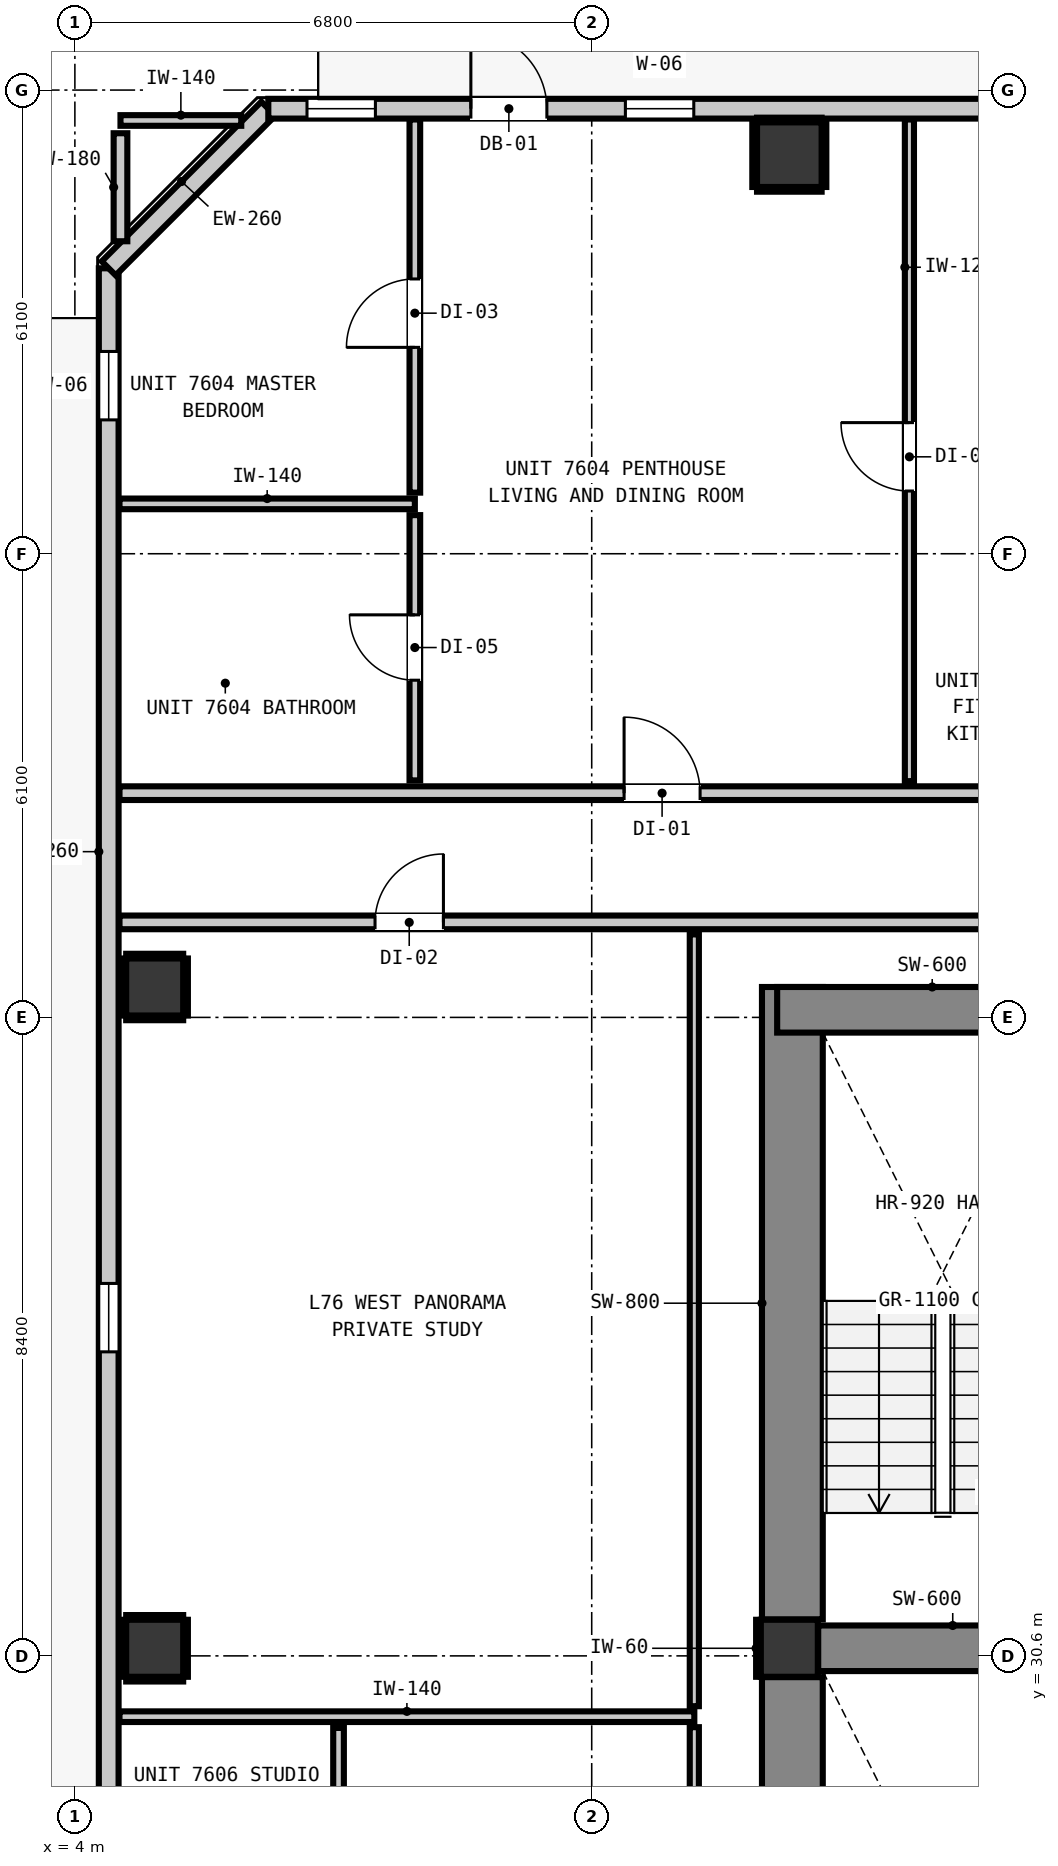
"""IFC4 building model, lengths in metres.
Left out: names, types, materials, properties, quantities, classifications, styles, units other than length and angle.
Written with IfcOpenShell. Run it as: python <this file> out.ifc"""

import sys

from ifc_helpers import new_model, si_unit, direction, frame, frame_2d, origin, origin_2d, place, context, subcontext, project, spatial, rectangle, extrude, element, fill, save


model = new_model("IFC4")
c1 = context("Model", 3, precision=1e-05, world=origin(), true_north=direction((0.0, 1.0)))
c2 = subcontext(c1, "Body", "Model", "MODEL_VIEW")
j1 = project(units=[si_unit("LENGTHUNIT", "METRE"), si_unit("PLANEANGLEUNIT", "RADIAN")], contexts=[c1])
p1 = place(None, origin())
s1 = spatial("IfcSite", under=j1, at=p1, CompositionType="ELEMENT")
p2 = place(p1, origin())
s2 = spatial("IfcBuilding", under=s1, at=p2, CompositionType="ELEMENT")
p3 = place(p2, frame((0.0, 0.0, 262.24)))
s3 = spatial("IfcBuildingStorey", under=s2, at=p3, CompositionType="ELEMENT", Elevation=262.24)
p4 = place(p3, frame((13.4, 30.7, 0.0), z_axis=(0.0, 0.0, 1.0), x_axis=(1.0, 0.0, 0.0)))
e1 = element("IfcColumn", 1, at=p4, inside=s3, PredefinedType="COLUMN", context=c2, shape_type="SweptSolid", body=[
    extrude(rectangle(XDim=0.75, YDim=0.75, at=origin_2d()), origin(), (0.0, 0.0, 1.0), 3.32),
])
p5 = place(p3, frame((13.44, 22.0, 0.0), z_axis=(0.0, 0.0, 1.0), x_axis=(0.0, 1.0, 0.0)))
e2 = element("IfcWall", 2, at=p5, inside=s3, PredefinedType="SHEAR", context=c2, shape_type="SweptSolid", body=[
    extrude(rectangle(XDim=8.32, YDim=0.8, at=frame_2d((4.16, 0.0))), origin(), (0.0, 0.0, 1.0), 3.32),
])
p6 = place(p3, frame((13.44, 31.08, 0.0), z_axis=(0.0, 0.0, 1.0), x_axis=(0.0, 1.0, 0.0)))
e3 = element("IfcWall", 3, at=p6, inside=s3, PredefinedType="SHEAR", context=c2, shape_type="SweptSolid", body=[
    extrude(rectangle(XDim=8.32, YDim=0.8, at=frame_2d((4.16, 0.0))), origin(), (0.0, 0.0, 1.0), 3.32),
])
p7 = place(p3, frame((13.24, 39.1, 0.0), z_axis=(0.0, 0.0, 1.0), x_axis=(1.0, 0.0, 0.0)))
e4 = element("IfcWall", 4, at=p7, inside=s3, PredefinedType="SHEAR", context=c2, shape_type="SweptSolid", body=[
    extrude(rectangle(XDim=4.08, YDim=0.6, at=frame_2d((2.04, 0.0))), origin(), (0.0, 0.0, 1.0), 3.32),
])
p8 = place(p3, frame((13.78, 30.7, 0.0), z_axis=(0.0, 0.0, 1.0), x_axis=(1.0, 0.0, 0.0)))
e5 = element("IfcWall", 5, at=p8, inside=s3, PredefinedType="SHEAR", context=c2, shape_type="SweptSolid", body=[
    extrude(rectangle(XDim=3.54, YDim=0.6, at=frame_2d((1.77, 0.0))), origin(), (0.0, 0.0, 1.0), 3.32),
])
p9 = place(p3, frame((13.4, 50.35, 0.0), z_axis=(0.0, 0.0, 1.0), x_axis=(1.0, 0.0, 0.0)))
e6 = element("IfcColumn", 6, at=p9, inside=s3, PredefinedType="COLUMN", context=c2, shape_type="SweptSolid", body=[
    extrude(rectangle(XDim=0.85, YDim=0.85, at=origin_2d()), origin(), (0.0, 0.0, 1.0), 3.32),
])
for number, where, z_axis, x_axis in (
    (7, (5.05, 30.7, 0.0), (0.0, 0.0, 1.0), (1.0, 0.0, 0.0)),
    (8, (5.05, 39.4, 0.0), (0.0, 0.0, 1.0), (1.0, 0.0, 0.0)),
):
    element("IfcColumn", number, at=place(p3, frame(where, z_axis=z_axis, x_axis=x_axis)), inside=s3, PredefinedType="COLUMN", context=c2, shape_type="SweptSolid", body=[
        extrude(rectangle(XDim=0.75, YDim=0.75, at=origin_2d()), origin(), (0.0, 0.0, 1.0), 3.32),
    ])
p10 = place(p3, frame((4.445, 18.545, 0.0), z_axis=(0.0, 0.0, 1.0), x_axis=(0.0, 1.0, 0.0)))
e9 = element("IfcWall", 9, at=p10, inside=s3, PredefinedType="STANDARD", context=c2, shape_type="SweptSolid", body=[
    extrude(rectangle(XDim=30.31, YDim=0.26, at=frame_2d((15.155, 0.0))), origin(), (0.0, 0.0, 1.0), 3.1),
])
p11 = place(p10, frame((4.434, 0.0, 0.0)))
e10 = element("IfcOpeningElement", 10, at=p11, cuts=e9, PredefinedType="OPENING", context=c2, shape_type="SweptSolid", body=[
    extrude(rectangle(XDim=1.0, YDim=2.15, at=frame_2d((0.5, 1.075))), frame((0.0, 0.14, 0.0), z_axis=(0.0, -1.0, 0.0), x_axis=(1.0, 0.0, 0.0)), (0.0, 0.0, 1.0), 0.28),
])
p12 = place(p10, frame((28.316, 0.0, 0.85)))
e11 = element("IfcOpeningElement", 11, at=p12, cuts=e9, PredefinedType="OPENING", context=c2, shape_type="SweptSolid", body=[
    extrude(rectangle(XDim=0.9, YDim=1.5, at=frame_2d((0.45, 0.75))), frame((0.0, 0.14, 0.0), z_axis=(0.0, -1.0, 0.0), x_axis=(1.0, 0.0, 0.0)), (0.0, 0.0, 1.0), 0.28),
])
p13 = place(p10, frame((16.055, 0.0, 0.85)))
e12 = element("IfcOpeningElement", 12, at=p13, cuts=e9, PredefinedType="OPENING", context=c2, shape_type="SweptSolid", body=[
    extrude(rectangle(XDim=0.9, YDim=1.5, at=frame_2d((0.45, 0.75))), frame((0.0, 0.14, 0.0), z_axis=(0.0, -1.0, 0.0), x_axis=(1.0, 0.0, 0.0)), (0.0, 0.0, 1.0), 0.28),
])
p14 = place(p3, frame((4.445, 48.855, 0.0), z_axis=(0.0, 0.0, 1.0), x_axis=(0.707065676302, 0.707147883682, 0.0)))
e13 = element("IfcWall", 13, at=p14, inside=s3, PredefinedType="STANDARD", context=c2, shape_type="SweptSolid", body=[
    extrude(rectangle(XDim=2.97, YDim=0.26, at=frame_2d((1.485, 0.0))), origin(), (0.0, 0.0, 1.0), 3.1),
])
p15 = place(p3, frame((6.545, 50.955, 0.0), z_axis=(0.0, 0.0, 1.0), x_axis=(1.0, 0.0, 0.0)))
e14 = element("IfcWall", 14, at=p15, inside=s3, PredefinedType="STANDARD", context=c2, shape_type="SweptSolid", body=[
    extrude(rectangle(XDim=32.71, YDim=0.26, at=frame_2d((16.355, 0.0))), origin(), (0.0, 0.0, 1.0), 3.1),
])
p16 = place(p15, frame((2.665, 0.0, 0.0)))
e15 = element("IfcOpeningElement", 15, at=p16, cuts=e14, PredefinedType="OPENING", context=c2, shape_type="SweptSolid", body=[
    extrude(rectangle(XDim=1.0, YDim=2.15, at=frame_2d((0.5, 1.075))), frame((0.0, 0.14, 0.0), z_axis=(0.0, -1.0, 0.0), x_axis=(1.0, 0.0, 0.0)), (0.0, 0.0, 1.0), 0.28),
])
p17 = place(p15, frame((4.698, 0.0, 0.85)))
e16 = element("IfcOpeningElement", 16, at=p17, cuts=e14, PredefinedType="OPENING", context=c2, shape_type="SweptSolid", body=[
    extrude(rectangle(XDim=0.9, YDim=1.5, at=frame_2d((0.45, 0.75))), frame((0.0, 0.14, 0.0), z_axis=(0.0, -1.0, 0.0), x_axis=(1.0, 0.0, 0.0)), (0.0, 0.0, 1.0), 0.28),
])
p18 = place(p15, frame((0.509, 0.0, 0.85)))
e17 = element("IfcOpeningElement", 17, at=p18, cuts=e14, PredefinedType="OPENING", context=c2, shape_type="SweptSolid", body=[
    extrude(rectangle(XDim=0.9, YDim=1.5, at=frame_2d((0.45, 0.75))), frame((0.0, 0.14, 0.0), z_axis=(0.0, -1.0, 0.0), x_axis=(1.0, 0.0, 0.0)), (0.0, 0.0, 1.0), 0.28),
])
p19 = place(p15, frame((15.827, 0.0, 0.85)))
e18 = element("IfcOpeningElement", 18, at=p19, cuts=e14, PredefinedType="OPENING", context=c2, shape_type="SweptSolid", body=[
    extrude(rectangle(XDim=0.9, YDim=1.5, at=frame_2d((0.45, 0.75))), frame((0.0, 0.14, 0.0), z_axis=(0.0, -1.0, 0.0), x_axis=(1.0, 0.0, 0.0)), (0.0, 0.0, 1.0), 0.28),
])
p20 = place(p15, frame((25.855, 0.0, 0.85)))
e19 = element("IfcOpeningElement", 19, at=p20, cuts=e14, PredefinedType="OPENING", context=c2, shape_type="SweptSolid", body=[
    extrude(rectangle(XDim=0.9, YDim=1.5, at=frame_2d((0.45, 0.75))), frame((0.0, 0.14, 0.0), z_axis=(0.0, -1.0, 0.0), x_axis=(1.0, 0.0, 0.0)), (0.0, 0.0, 1.0), 0.28),
])
p21 = place(p3, frame((4.587, 40.25, 0.0), z_axis=(0.0, 0.0, 1.0), x_axis=(1.0, 0.0, 0.0)))
e20 = element("IfcWall", 20, at=p21, inside=s3, PredefinedType="PARTITIONING", context=c2, shape_type="SweptSolid", body=[
    extrude(rectangle(XDim=36.626, YDim=0.18, at=frame_2d((18.313, 0.0))), origin(), (0.0, 0.0, 1.0), 3.1),
])
p22 = place(p21, frame((12.848, 0.0, 0.0)))
e21 = element("IfcOpeningElement", 21, at=p22, cuts=e20, PredefinedType="OPENING", context=c2, shape_type="SweptSolid", body=[
    extrude(rectangle(XDim=1.4, YDim=2.15, at=frame_2d((0.7, 1.075))), frame((0.0, 0.1, 0.0), z_axis=(0.0, -1.0, 0.0), x_axis=(1.0, 0.0, 0.0)), (0.0, 0.0, 1.0), 0.2),
])
p23 = place(p21, frame((3.362, 0.0, 0.0)))
e22 = element("IfcOpeningElement", 22, at=p23, cuts=e20, PredefinedType="OPENING", context=c2, shape_type="SweptSolid", body=[
    extrude(rectangle(XDim=0.9, YDim=2.1, at=frame_2d((0.45, 1.05))), frame((0.0, 0.1, 0.0), z_axis=(0.0, -1.0, 0.0), x_axis=(1.0, 0.0, 0.0)), (0.0, 0.0, 1.0), 0.2),
])
p24 = place(p3, frame((4.587, 41.95, 0.0), z_axis=(0.0, 0.0, 1.0), x_axis=(1.0, 0.0, 0.0)))
e23 = element("IfcWall", 23, at=p24, inside=s3, PredefinedType="PARTITIONING", context=c2, shape_type="SweptSolid", body=[
    extrude(rectangle(XDim=36.626, YDim=0.18, at=frame_2d((18.313, 0.0))), origin(), (0.0, 0.0, 1.0), 3.1),
])
p25 = place(p24, frame((6.639, 0.0, 0.0)))
e24 = element("IfcOpeningElement", 24, at=p25, cuts=e23, PredefinedType="OPENING", context=c2, shape_type="SweptSolid", body=[
    extrude(rectangle(XDim=1.0, YDim=2.15, at=frame_2d((0.5, 1.075))), frame((0.0, 0.1, 0.0), z_axis=(0.0, -1.0, 0.0), x_axis=(1.0, 0.0, 0.0)), (0.0, 0.0, 1.0), 0.2),
])
p26 = place(p24, frame((15.721, 0.0, 0.0)))
e25 = element("IfcOpeningElement", 25, at=p26, cuts=e23, PredefinedType="OPENING", context=c2, shape_type="SweptSolid", body=[
    extrude(rectangle(XDim=1.0, YDim=2.15, at=frame_2d((0.5, 1.075))), frame((0.0, 0.1, 0.0), z_axis=(0.0, -1.0, 0.0), x_axis=(1.0, 0.0, 0.0)), (0.0, 0.0, 1.0), 0.2),
])
p27 = place(p24, frame((29.299, 0.0, 0.0)))
e26 = element("IfcOpeningElement", 26, at=p27, cuts=e23, PredefinedType="OPENING", context=c2, shape_type="SweptSolid", body=[
    extrude(rectangle(XDim=0.9, YDim=2.1, at=frame_2d((0.45, 1.05))), frame((0.0, 0.1, 0.0), z_axis=(0.0, -1.0, 0.0), x_axis=(1.0, 0.0, 0.0)), (0.0, 0.0, 1.0), 0.2),
])
p28 = place(p3, frame((4.587, 29.8, 0.0), z_axis=(0.0, 0.0, 1.0), x_axis=(1.0, 0.0, 0.0)))
e27 = element("IfcWall", 27, at=p28, inside=s3, PredefinedType="PARTITIONING", context=c2, shape_type="SweptSolid", body=[
    extrude(rectangle(XDim=7.563, YDim=0.14, at=frame_2d((3.781, 0.0))), origin(), (0.0, 0.0, 1.0), 3.1),
])
p29 = place(p3, frame((4.587, 45.756, 0.0), z_axis=(0.0, 0.0, 1.0), x_axis=(1.0, 0.0, 0.0)))
e28 = element("IfcWall", 28, at=p29, inside=s3, PredefinedType="PARTITIONING", context=c2, shape_type="SweptSolid", body=[
    extrude(rectangle(XDim=3.886, YDim=0.14, at=frame_2d((1.943, 0.0))), origin(), (0.0, 0.0, 1.0), 3.1),
])
p30 = place(p3, frame((4.6, 50.8, 0.0), z_axis=(0.0, 0.0, 1.0), x_axis=(1.0, 0.0, 0.0)))
e29 = element("IfcWall", 29, at=p30, inside=s3, PredefinedType="PARTITIONING", context=c2, shape_type="SweptSolid", body=[
    extrude(rectangle(XDim=1.589, YDim=0.14, at=frame_2d((0.794, 0.0))), origin(), (0.0, 0.0, 1.0), 3.1),
])
p31 = place(p3, frame((4.6, 49.211, 0.0), z_axis=(0.0, 0.0, 1.0), x_axis=(0.0, 1.0, 0.0)))
e30 = element("IfcWall", 30, at=p31, inside=s3, PredefinedType="PARTITIONING", context=c2, shape_type="SweptSolid", body=[
    extrude(rectangle(XDim=1.421, YDim=0.18, at=frame_2d((0.71, 0.0))), origin(), (0.0, 0.0, 1.0), 3.1),
])
p32 = place(p3, frame((7.469, 25.017, 0.0), z_axis=(0.0, 0.0, 1.0), x_axis=(0.0, 1.0, 0.0)))
e31 = element("IfcWall", 31, at=p32, inside=s3, PredefinedType="PARTITIONING", context=c2, shape_type="SweptSolid", body=[
    extrude(rectangle(XDim=4.635, YDim=0.14, at=frame_2d((2.317, 0.0))), origin(), (0.0, 0.0, 1.0), 3.1),
])
p33 = place(p32, frame((1.875, 0.0, 0.0)))
e32 = element("IfcOpeningElement", 32, at=p33, cuts=e31, PredefinedType="OPENING", context=c2, shape_type="SweptSolid", body=[
    extrude(rectangle(XDim=0.86, YDim=2.02, at=frame_2d((0.43, 1.01))), frame((0.0, 0.08, 0.0), z_axis=(0.0, -1.0, 0.0), x_axis=(1.0, 0.0, 0.0)), (0.0, 0.0, 1.0), 0.16),
])
p34 = place(p3, frame((8.473, 42.118, 0.0), z_axis=(0.0, 0.0, 1.0), x_axis=(0.0, 1.0, 0.0)))
e33 = element("IfcWall", 33, at=p34, inside=s3, PredefinedType="PARTITIONING", context=c2, shape_type="SweptSolid", body=[
    extrude(rectangle(XDim=3.49, YDim=0.14, at=frame_2d((1.745, 0.0))), origin(), (0.0, 0.0, 1.0), 3.1),
])
p35 = place(p34, frame((1.318, 0.0, 0.0)))
e34 = element("IfcOpeningElement", 34, at=p35, cuts=e33, PredefinedType="OPENING", context=c2, shape_type="SweptSolid", body=[
    extrude(rectangle(XDim=0.86, YDim=2.02, at=frame_2d((0.43, 1.01))), frame((0.0, 0.08, 0.0), z_axis=(0.0, -1.0, 0.0), x_axis=(1.0, 0.0, 0.0)), (0.0, 0.0, 1.0), 0.16),
])
p36 = place(p3, frame((8.473, 45.904, 0.0), z_axis=(0.0, 0.0, 1.0), x_axis=(0.0, 1.0, 0.0)))
e35 = element("IfcWall", 35, at=p36, inside=s3, PredefinedType="PARTITIONING", context=c2, shape_type="SweptSolid", body=[
    extrude(rectangle(XDim=4.909, YDim=0.14, at=frame_2d((2.455, 0.0))), origin(), (0.0, 0.0, 1.0), 3.1),
])
p37 = place(p36, frame((1.911, 0.0, 0.0)))
e36 = element("IfcOpeningElement", 36, at=p37, cuts=e35, PredefinedType="OPENING", context=c2, shape_type="SweptSolid", body=[
    extrude(rectangle(XDim=0.9, YDim=2.1, at=frame_2d((0.45, 1.05))), frame((0.0, 0.08, 0.0), z_axis=(0.0, -1.0, 0.0), x_axis=(1.0, 0.0, 0.0)), (0.0, 0.0, 1.0), 0.16),
])
p38 = place(p3, frame((12.15, 21.338, 0.0), z_axis=(0.0, 0.0, 1.0), x_axis=(0.0, 1.0, 0.0)))
e37 = element("IfcWall", 37, at=p38, inside=s3, PredefinedType="PARTITIONING", context=c2, shape_type="SweptSolid", body=[
    extrude(rectangle(XDim=8.324, YDim=0.12, at=frame_2d((4.162, 0.0))), origin(), (0.0, 0.0, 1.0), 3.1),
])
p39 = place(p3, frame((12.15, 29.938, 0.0), z_axis=(0.0, 0.0, 1.0), x_axis=(0.0, 1.0, 0.0)))
e38 = element("IfcWall", 38, at=p39, inside=s3, PredefinedType="PARTITIONING", context=c2, shape_type="SweptSolid", body=[
    extrude(rectangle(XDim=10.154, YDim=0.12, at=frame_2d((5.077, 0.0))), origin(), (0.0, 0.0, 1.0), 3.1),
])
p40 = place(p3, frame((14.98, 42.108, 0.0), z_axis=(0.0, 0.0, 1.0), x_axis=(0.0, 1.0, 0.0)))
e39 = element("IfcWall", 39, at=p40, inside=s3, PredefinedType="PARTITIONING", context=c2, shape_type="SweptSolid", body=[
    extrude(rectangle(XDim=8.705, YDim=0.12, at=frame_2d((4.353, 0.0))), origin(), (0.0, 0.0, 1.0), 3.1),
])
p41 = place(p40, frame((3.817, 0.0, 0.0)))
e40 = element("IfcOpeningElement", 40, at=p41, cuts=e39, PredefinedType="OPENING", context=c2, shape_type="SweptSolid", body=[
    extrude(rectangle(XDim=0.9, YDim=2.1, at=frame_2d((0.45, 1.05))), frame((0.0, 0.07, 0.0), z_axis=(0.0, -1.0, 0.0), x_axis=(1.0, 0.0, 0.0)), (0.0, 0.0, 1.0), 0.14),
])
p42 = place(p3, frame((12.993, 30.325, 0.0), z_axis=(0.0, 0.0, 1.0), x_axis=(0.0, 1.0, 0.0)))
e41 = element("IfcWall", 41, at=p42, inside=s3, PredefinedType="PARTITIONING", context=c2, shape_type="SweptSolid", body=[
    extrude(rectangle(XDim=0.75, YDim=0.06, at=frame_2d((0.375, 0.0))), origin(), (0.0, 0.0, 1.0), 1.45),
])
for number, where, z_axis, x_axis in (
    (42, (12.975, 49.893, 0.0), (0.0, 0.0, 1.0), (1.0, 0.0, 0.0)),
    (43, (12.975, 50.807, 0.0), (0.0, 0.0, 1.0), (1.0, 0.0, 0.0)),
    (44, (12.943, 49.925, 0.0), (0.0, 0.0, 1.0), (0.0, 1.0, 0.0)),
    (45, (13.857, 49.925, 0.0), (0.0, 0.0, 1.0), (0.0, 1.0, 0.0)),
):
    element("IfcWall", number, at=place(p3, frame(where, z_axis=z_axis, x_axis=x_axis)), inside=s3, PredefinedType="PARTITIONING", context=c2, shape_type="SweptSolid", body=[
        extrude(rectangle(XDim=0.85, YDim=0.06, at=frame_2d((0.425, 0.0))), origin(), (0.0, 0.0, 1.0), 1.45),
    ])
for number, where, z_axis, x_axis in (
    (46, (4.675, 30.293, 0.0), (0.0, 0.0, 1.0), (1.0, 0.0, 0.0)),
    (47, (4.675, 31.107, 0.0), (0.0, 0.0, 1.0), (1.0, 0.0, 0.0)),
    (48, (4.643, 30.325, 0.0), (0.0, 0.0, 1.0), (0.0, 1.0, 0.0)),
    (49, (5.457, 30.325, 0.0), (0.0, 0.0, 1.0), (0.0, 1.0, 0.0)),
    (50, (4.675, 38.993, 0.0), (0.0, 0.0, 1.0), (1.0, 0.0, 0.0)),
    (51, (4.675, 39.807, 0.0), (0.0, 0.0, 1.0), (1.0, 0.0, 0.0)),
    (52, (4.643, 39.025, 0.0), (0.0, 0.0, 1.0), (0.0, 1.0, 0.0)),
    (53, (5.457, 39.025, 0.0), (0.0, 0.0, 1.0), (0.0, 1.0, 0.0)),
):
    element("IfcWall", number, at=place(p3, frame(where, z_axis=z_axis, x_axis=x_axis)), inside=s3, PredefinedType="PARTITIONING", context=c2, shape_type="SweptSolid", body=[
        extrude(rectangle(XDim=0.75, YDim=0.06, at=frame_2d((0.375, 0.0))), origin(), (0.0, 0.0, 1.0), 1.45),
    ])
p43 = place(p16, origin())
e54 = element("IfcDoor", 54, at=p43, inside=s3, OperationType="SINGLE_SWING_LEFT", PredefinedType="DOOR", context=c2, shape_type="SweptSolid", body=[
    extrude(rectangle(XDim=1.0, YDim=2.15, at=frame_2d((0.5, 1.075))), frame((0.0, 0.025, 0.0), z_axis=(0.0, -1.0, 0.0), x_axis=(1.0, 0.0, 0.0)), (0.0, 0.0, 1.0), 0.05),
])
fill(e15, e54)
p44 = place(p12, origin())
e55 = element("IfcWindow", 55, at=p44, inside=s3, PartitioningType="SINGLE_PANEL", PredefinedType="WINDOW", context=c2, shape_type="SweptSolid", body=[
    extrude(rectangle(XDim=0.9, YDim=1.5, at=frame_2d((0.45, 0.75))), frame((0.0, 0.03, 0.0), z_axis=(0.0, -1.0, 0.0), x_axis=(1.0, 0.0, 0.0)), (0.0, 0.0, 1.0), 0.06),
])
fill(e11, e55)
p45 = place(p13, origin())
e56 = element("IfcWindow", 56, at=p45, inside=s3, PartitioningType="SINGLE_PANEL", PredefinedType="WINDOW", context=c2, shape_type="SweptSolid", body=[
    extrude(rectangle(XDim=0.9, YDim=1.5, at=frame_2d((0.45, 0.75))), frame((0.0, 0.03, 0.0), z_axis=(0.0, -1.0, 0.0), x_axis=(1.0, 0.0, 0.0)), (0.0, 0.0, 1.0), 0.06),
])
fill(e12, e56)
p46 = place(p17, origin())
e57 = element("IfcWindow", 57, at=p46, inside=s3, PartitioningType="SINGLE_PANEL", PredefinedType="WINDOW", context=c2, shape_type="SweptSolid", body=[
    extrude(rectangle(XDim=0.9, YDim=1.5, at=frame_2d((0.45, 0.75))), frame((0.0, 0.03, 0.0), z_axis=(0.0, -1.0, 0.0), x_axis=(1.0, 0.0, 0.0)), (0.0, 0.0, 1.0), 0.06),
])
fill(e16, e57)
p47 = place(p18, origin())
e58 = element("IfcWindow", 58, at=p47, inside=s3, PartitioningType="SINGLE_PANEL", PredefinedType="WINDOW", context=c2, shape_type="SweptSolid", body=[
    extrude(rectangle(XDim=0.9, YDim=1.5, at=frame_2d((0.45, 0.75))), frame((0.0, 0.03, 0.0), z_axis=(0.0, -1.0, 0.0), x_axis=(1.0, 0.0, 0.0)), (0.0, 0.0, 1.0), 0.06),
])
fill(e17, e58)
p48 = place(p25, origin())
e59 = element("IfcDoor", 59, at=p48, inside=s3, OperationType="SINGLE_SWING_LEFT", PredefinedType="DOOR", context=c2, shape_type="SweptSolid", body=[
    extrude(rectangle(XDim=1.0, YDim=2.15, at=frame_2d((0.5, 1.075))), frame((0.0, 0.025, 0.0), z_axis=(0.0, -1.0, 0.0), x_axis=(1.0, 0.0, 0.0)), (0.0, 0.0, 1.0), 0.05),
])
fill(e24, e59)
p49 = place(p35, origin())
e60 = element("IfcDoor", 60, at=p49, inside=s3, OperationType="SINGLE_SWING_RIGHT", PredefinedType="DOOR", context=c2, shape_type="SweptSolid", body=[
    extrude(rectangle(XDim=0.86, YDim=2.02, at=frame_2d((0.43, 1.01))), frame((0.0, 0.025, 0.0), z_axis=(0.0, -1.0, 0.0), x_axis=(1.0, 0.0, 0.0)), (0.0, 0.0, 1.0), 0.05),
])
fill(e34, e60)
p50 = place(p37, origin())
e61 = element("IfcDoor", 61, at=p50, inside=s3, OperationType="SINGLE_SWING_LEFT", PredefinedType="DOOR", context=c2, shape_type="SweptSolid", body=[
    extrude(rectangle(XDim=0.9, YDim=2.1, at=frame_2d((0.45, 1.05))), frame((0.0, 0.025, 0.0), z_axis=(0.0, -1.0, 0.0), x_axis=(1.0, 0.0, 0.0)), (0.0, 0.0, 1.0), 0.05),
])
fill(e36, e61)
p51 = place(p41, origin())
e62 = element("IfcDoor", 62, at=p51, inside=s3, OperationType="SINGLE_SWING_RIGHT", PredefinedType="DOOR", context=c2, shape_type="SweptSolid", body=[
    extrude(rectangle(XDim=0.9, YDim=2.1, at=frame_2d((0.45, 1.05))), frame((0.0, 0.025, 0.0), z_axis=(0.0, -1.0, 0.0), x_axis=(1.0, 0.0, 0.0)), (0.0, 0.0, 1.0), 0.05),
])
fill(e40, e62)
p52 = place(p23, origin())
e63 = element("IfcDoor", 63, at=p52, inside=s3, OperationType="SINGLE_SWING_RIGHT", PredefinedType="DOOR", context=c2, shape_type="SweptSolid", body=[
    extrude(rectangle(XDim=0.9, YDim=2.1, at=frame_2d((0.45, 1.05))), frame((0.0, 0.025, 0.0), z_axis=(0.0, -1.0, 0.0), x_axis=(1.0, 0.0, 0.0)), (0.0, 0.0, 1.0), 0.05),
])
fill(e22, e63)
save(model, sys.argv[1])
